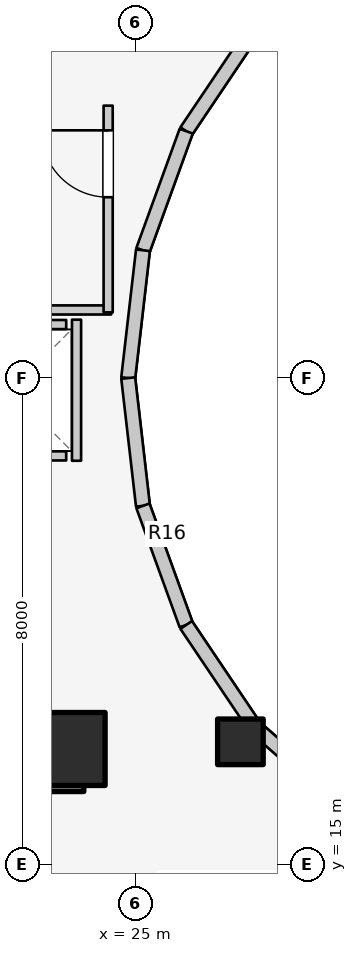
"""IFC4 building model, lengths in metres.
Left out: names, types, materials, properties, quantities, classifications, styles, units other than length and angle.
Written with IfcOpenShell. Run it as: python <this file> out.ifc"""

import sys

from ifc_helpers import new_model, si_unit, direction, frame, frame_2d, origin, origin_2d, place, context, subcontext, project, spatial, rectangle, extrude, element, fill, save


model = new_model("IFC4")
c1 = context("Model", 3, precision=1e-05, world=origin(), true_north=direction((0.0, 1.0)))
c2 = subcontext(c1, "Body", "Model", "MODEL_VIEW")
j1 = project(units=[si_unit("LENGTHUNIT", "METRE"), si_unit("PLANEANGLEUNIT", "RADIAN")], contexts=[c1])
p1 = place(None, origin())
s1 = spatial("IfcSite", under=j1, at=p1, CompositionType="ELEMENT")
p2 = place(p1, origin())
s2 = spatial("IfcBuilding", under=s1, at=p2, CompositionType="ELEMENT")
p3 = place(p2, frame((0.0, 0.0, 168.4)))
s3 = spatial("IfcBuildingStorey", under=s2, at=p3, CompositionType="ELEMENT", Elevation=168.4)
p4 = place(p3, frame((19.65, 16.55, 0.0), z_axis=(0.0, 0.0, 1.0), x_axis=(1.0, 0.0, 0.0)))
e1 = element("IfcWall", 1, at=p4, inside=s3, PredefinedType="SHEAR", context=c2, shape_type="SweptSolid", body=[
    extrude(rectangle(XDim=4.5, YDim=0.7, at=frame_2d((2.25, 0.0))), origin(), (0.0, 0.0, 1.0), 3.1),
])
p5 = place(p3, frame((23.9, 16.9, 0.0), z_axis=(0.0, 0.0, 1.0), x_axis=(1.0, 0.0, 0.0)))
e2 = element("IfcColumn", 2, at=p5, inside=s3, PredefinedType="COLUMN", context=c2, shape_type="SweptSolid", body=[
    extrude(rectangle(XDim=1.2, YDim=1.2, at=origin_2d()), origin(), (0.0, 0.0, 1.0), 3.1),
])
p6 = place(p3, frame((26.725, 17.018, 0.0), z_axis=(0.0, 0.0, 1.0), x_axis=(1.0, 0.0, 0.0)))
e3 = element("IfcColumn", 3, at=p6, inside=s3, PredefinedType="COLUMN", context=c2, shape_type="SweptSolid", body=[
    extrude(rectangle(XDim=0.75, YDim=0.75, at=origin_2d()), origin(), (0.0, 0.0, 1.0), 3.1),
])
p7 = place(p3, frame((26.965, 28.742, 0.0), z_axis=(0.0, 0.0, 1.0), x_axis=(-0.558197800898, -0.829707909492, 0.0)))
e4 = element("IfcWall", 4, at=p7, inside=s3, PredefinedType="STANDARD", context=c2, shape_type="SweptSolid", body=[
    extrude(rectangle(XDim=2.027, YDim=0.23, at=frame_2d((1.013, 0.0))), origin(), (0.0, 0.0, 1.0), 1.22),
])
p8 = place(p3, frame((25.834, 27.06, 0.0), z_axis=(0.0, 0.0, 1.0), x_axis=(-0.341423187295, -0.93990968033, 0.0)))
e5 = element("IfcWall", 5, at=p8, inside=s3, PredefinedType="STANDARD", context=c2, shape_type="SweptSolid", body=[
    extrude(rectangle(XDim=2.084, YDim=0.23, at=frame_2d((1.042, 0.0))), origin(), (0.0, 0.0, 1.0), 2.56),
])
for number, where, z_axis, x_axis in (
    (6, (25.123, 25.102, 0.0), (0.0, 0.0, 1.0), (-0.115, -0.993, 0.0)),
    (7, (24.88, 23.0, 0.0), (0.0, 0.0, 1.0), (0.115, -0.993, 0.0)),
):
    element("IfcWall", number, at=place(p3, frame(where, z_axis=z_axis, x_axis=x_axis)), inside=s3, PredefinedType="STANDARD", context=c2, shape_type="SweptSolid", body=[
        extrude(rectangle(XDim=2.115, YDim=0.23, at=frame_2d((1.058, 0.0))), origin(), (0.0, 0.0, 1.0), 2.56),
    ])
p9 = place(p3, frame((25.123, 20.898, 0.0), z_axis=(0.0, 0.0, 1.0), x_axis=(0.341423187295, -0.93990968033, 0.0)))
e8 = element("IfcWall", 8, at=p9, inside=s3, PredefinedType="STANDARD", context=c2, shape_type="SweptSolid", body=[
    extrude(rectangle(XDim=2.084, YDim=0.23, at=frame_2d((1.042, 0.0))), origin(), (0.0, 0.0, 1.0), 2.56),
])
p10 = place(p3, frame((25.834, 18.94, 0.0), z_axis=(0.0, 0.0, 1.0), x_axis=(0.558197800898, -0.829707909492, 0.0)))
e9 = element("IfcWall", 9, at=p10, inside=s3, PredefinedType="STANDARD", context=c2, shape_type="SweptSolid", body=[
    extrude(rectangle(XDim=2.027, YDim=0.23, at=frame_2d((1.013, 0.0))), origin(), (0.0, 0.0, 1.0), 1.22),
])
p11 = place(p3, frame((26.965, 17.258, 0.0), z_axis=(0.0, 0.0, 1.0), x_axis=(0.752576694707, -0.658504607869, 0.0)))
e10 = element("IfcWall", 10, at=p11, inside=s3, PredefinedType="STANDARD", context=c2, shape_type="SweptSolid", body=[
    extrude(rectangle(XDim=1.959, YDim=0.23, at=frame_2d((0.98, 0.0))), origin(), (0.0, 0.0, 1.0), 1.22),
])
for number, where, z_axis, x_axis in (
    (11, (22.04, 21.72, 0.0), (0.0, 0.0, 1.0), (1.0, 0.0, 0.0)),
    (12, (22.04, 23.88, 0.0), (0.0, 0.0, 1.0), (1.0, 0.0, 0.0)),
):
    element("IfcWall", number, at=place(p3, frame(where, z_axis=z_axis, x_axis=x_axis)), inside=s3, PredefinedType="SOLIDWALL", context=c2, shape_type="SweptSolid", body=[
        extrude(rectangle(XDim=1.82, YDim=0.15, at=frame_2d((0.91, 0.0))), origin(), (0.0, 0.0, 1.0), 2.12),
    ])
p12 = place(p3, frame((24.03, 21.64, 0.0), z_axis=(0.0, 0.0, 1.0), x_axis=(0.0, 1.0, 0.0)))
e13 = element("IfcWall", 13, at=p12, inside=s3, PredefinedType="SOLIDWALL", context=c2, shape_type="SweptSolid", body=[
    extrude(rectangle(XDim=2.32, YDim=0.15, at=frame_2d((1.16, 0.0))), origin(), (0.0, 0.0, 1.0), 2.12),
])
p13 = place(p3, frame((19.52, 24.12, 0.0), z_axis=(0.0, 0.0, 1.0), x_axis=(1.0, 0.0, 0.0)))
e14 = element("IfcWall", 14, at=p13, inside=s3, PredefinedType="PARTITIONING", context=c2, shape_type="SweptSolid", body=[
    extrude(rectangle(XDim=5.08, YDim=0.15, at=frame_2d((2.54, 0.0))), origin(), (0.0, 0.0, 1.0), 2.12),
])
p14 = place(p3, frame((24.55, 24.08, 0.0), z_axis=(0.0, 0.0, 1.0), x_axis=(0.0, 1.0, 0.0)))
e15 = element("IfcWall", 15, at=p14, inside=s3, PredefinedType="PARTITIONING", context=c2, shape_type="SweptSolid", body=[
    extrude(rectangle(XDim=3.4, YDim=0.15, at=frame_2d((1.7, 0.0))), origin(), (0.0, 0.0, 1.0), 2.575),
])
p15 = place(p14, frame((1.894, 0.0, 0.0)))
e16 = element("IfcOpeningElement", 16, at=p15, cuts=e15, PredefinedType="OPENING", context=c2, shape_type="SweptSolid", body=[
    extrude(rectangle(XDim=1.1, YDim=2.1, at=frame_2d((0.55, 1.05))), frame((0.0, 0.085, 0.0), z_axis=(0.0, -1.0, 0.0), x_axis=(1.0, 0.0, 0.0)), (0.0, 0.0, 1.0), 0.17),
])
p16 = place(p3, frame((28.45, 15.985, 0.0), z_axis=(0.0, 0.0, 1.0), x_axis=(-0.524565340045, -0.851370192116, 0.0)))
e17 = element("IfcWall", 17, at=p16, inside=s3, PredefinedType="PARTITIONING", context=c2, shape_type="SweptSolid", body=[
    extrude(rectangle(XDim=3.027, YDim=0.125, at=frame_2d((1.514, 0.0))), origin(), (0.0, 0.0, 1.0), 1.22),
])
p17 = place(p15, origin())
e18 = element("IfcDoor", 18, at=p17, inside=s3, OperationType="SINGLE_SWING_RIGHT", PredefinedType="DOOR", context=c2, shape_type="SweptSolid", body=[
    extrude(rectangle(XDim=1.1, YDim=2.1, at=frame_2d((0.55, 1.05))), frame((0.0, 0.025, 0.0), z_axis=(0.0, -1.0, 0.0), x_axis=(1.0, 0.0, 0.0)), (0.0, 0.0, 1.0), 0.05),
])
fill(e16, e18)
save(model, sys.argv[1])
